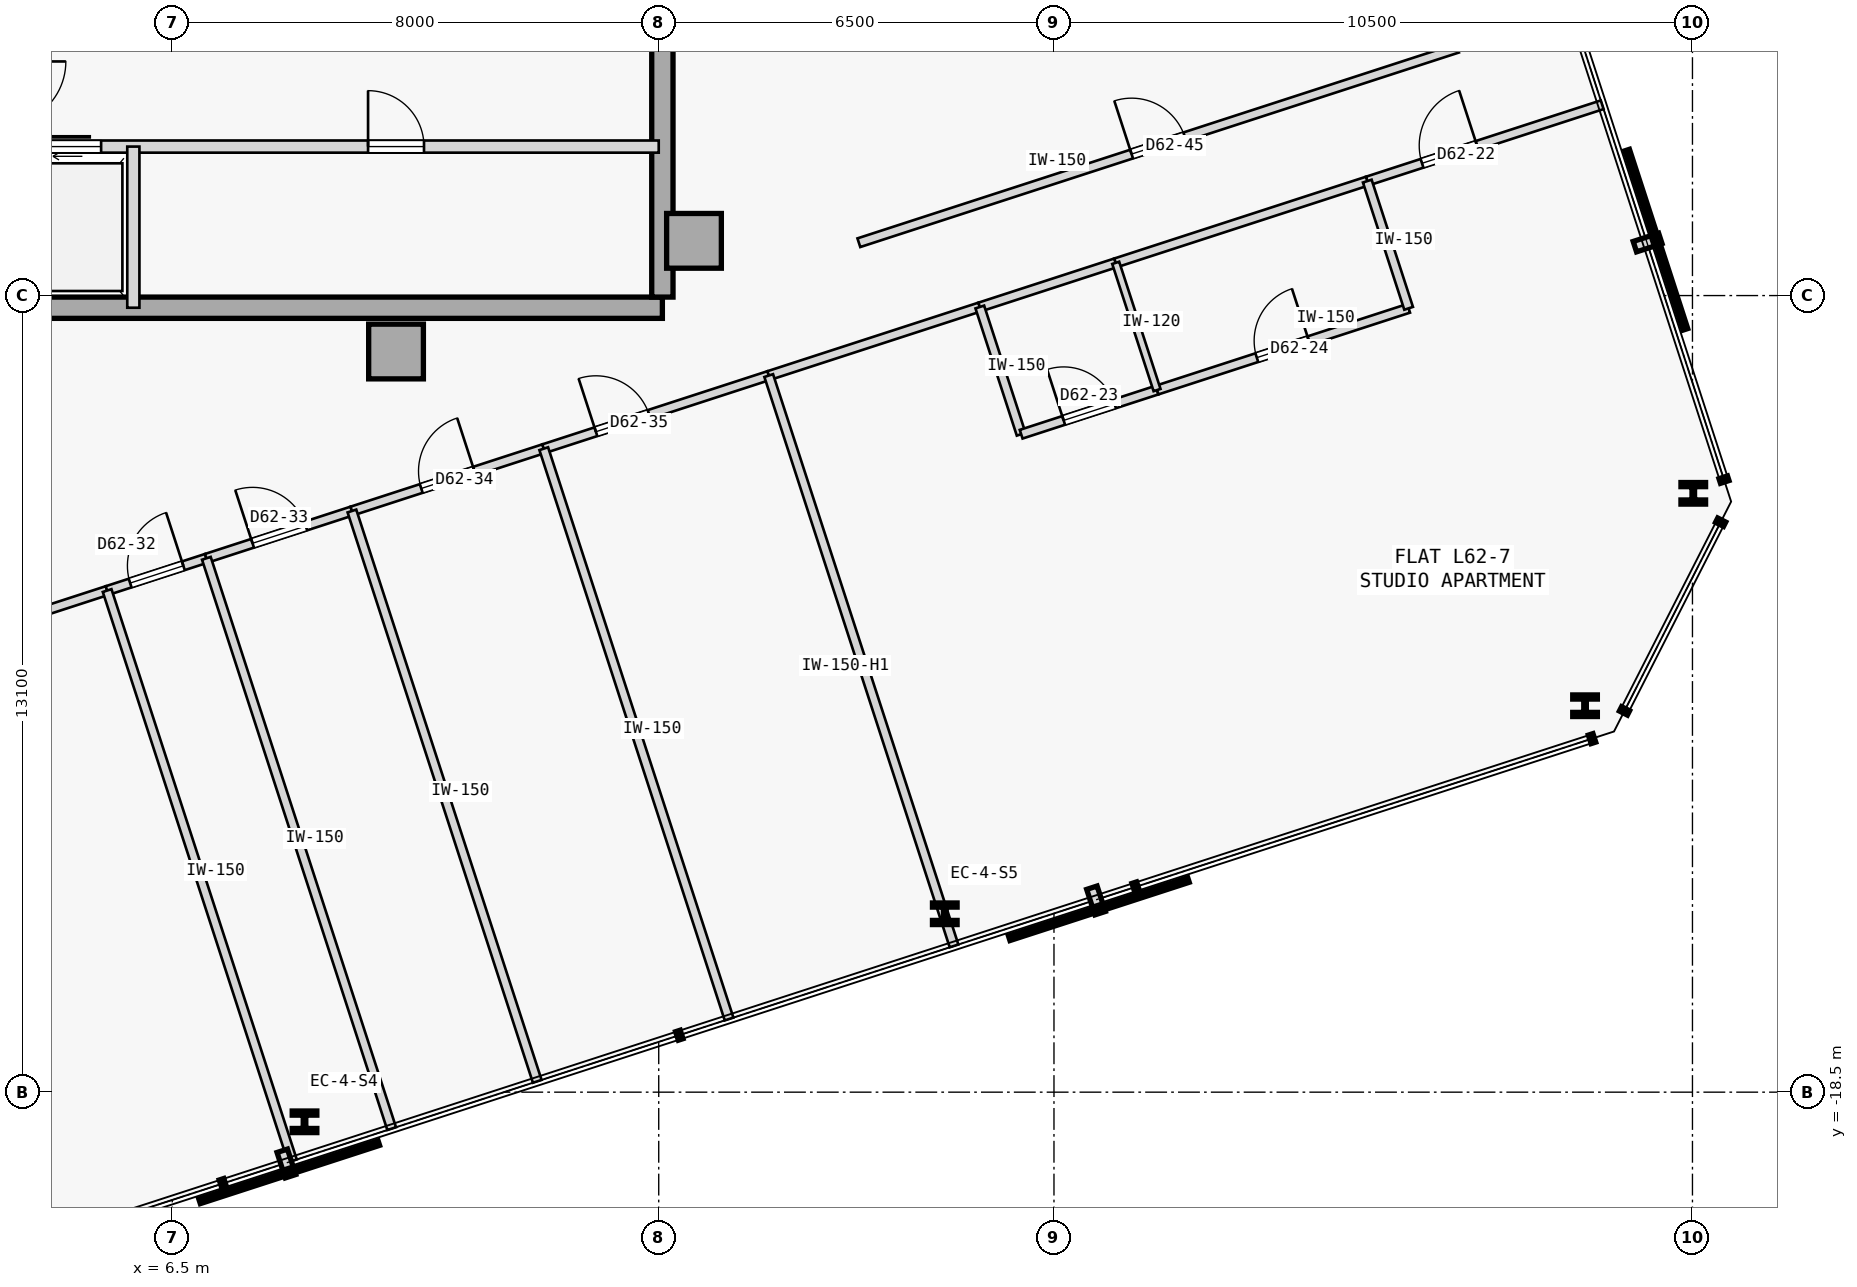
"""IFC4 building model, lengths in metres.
Left out: names, types, materials, properties, quantities, classifications, styles, units other than length and angle.
Written with IfcOpenShell. Run it as: python <this file> out.ifc"""

import sys

from ifc_helpers import new_model, si_unit, direction, frame, frame_2d, origin, origin_2d, place, context, subcontext, project, spatial, rectangle, i_section, extrude, element, fill, save


model = new_model("IFC4")
c1 = context("Model", 3, precision=1e-05, world=origin(), true_north=direction((0.0, 1.0)))
c2 = subcontext(c1, "Body", "Model", "MODEL_VIEW")
j1 = project(units=[si_unit("LENGTHUNIT", "METRE"), si_unit("PLANEANGLEUNIT", "RADIAN")], contexts=[c1])
p1 = place(None, origin())
s1 = spatial("IfcSite", under=j1, at=p1, CompositionType="ELEMENT")
p2 = place(p1, origin())
s2 = spatial("IfcBuilding", under=s1, at=p2, CompositionType="ELEMENT")
p3 = place(p2, frame((0.0, 0.0, 234.35)))
s3 = spatial("IfcBuildingStorey", under=s2, at=p3, CompositionType="ELEMENT", Elevation=234.35)
for number, where, z_axis, x_axis in (
    (1, (15.08, -4.5, 0.0), (0.0, 0.0, 1.0), (1.0, 0.0, 0.0)),
    (2, (10.18, -6.32, 0.0), (0.0, 0.0, 1.0), (1.0, 0.0, 0.0)),
):
    element("IfcColumn", number, at=place(p3, frame(where, z_axis=z_axis, x_axis=x_axis)), inside=s3, PredefinedType="COLUMN", context=c2, shape_type="SweptSolid", body=[
        extrude(rectangle(XDim=0.9, YDim=0.9, at=origin_2d()), origin(), (0.0, 0.0, 1.0), 3.35),
    ])
p4 = place(p3, frame((3.7, -5.6, 0.0), z_axis=(0.0, 0.0, 1.0), x_axis=(1.0, 0.0, 0.0)))
e3 = element("IfcWall", 3, at=p4, inside=s3, PredefinedType="SHEAR", context=c2, shape_type="SweptSolid", body=[
    extrude(rectangle(XDim=10.86, YDim=0.35, at=frame_2d((5.43, 0.0))), origin(), (0.0, 0.0, 1.0), 3.125),
])
p5 = place(p3, frame((14.56, -5.425, 0.0), z_axis=(0.0, 0.0, 1.0), x_axis=(0.0, 1.0, 0.0)))
e4 = element("IfcWall", 4, at=p5, inside=s3, PredefinedType="SHEAR", context=c2, shape_type="SweptSolid", body=[
    extrude(rectangle(XDim=10.85, YDim=0.35, at=frame_2d((5.425, 0.0))), origin(), (0.0, 0.0, 1.0), 3.125),
])
for number, where, z_axis, x_axis in (
    (5, (8.675, -18.988, 0.0), (0.0, 0.0, 1.0), (1.0, 0.0, 0.0)),
    (6, (19.204, -15.566, 0.0), (0.0, 0.0, 1.0), (1.0, 0.0, 0.0)),
    (7, (29.734, -12.145, 0.0), (0.0, 0.0, 1.0), (1.0, 0.0, 0.0)),
    (8, (31.513, -8.652, 0.0), (0.0, 0.0, 1.0), (1.0, 0.0, 0.0)),
):
    element("IfcColumn", number, at=place(p3, frame(where, z_axis=z_axis, x_axis=x_axis)), inside=s3, PredefinedType="COLUMN", context=c2, shape_type="SweptSolid", body=[
        extrude(i_section(OverallWidth=0.405, OverallDepth=0.355, WebThickness=0.042, FlangeThickness=0.068, FilletRadius=0.015, at=origin_2d()), origin(), (0.0, 0.0, 1.0), 3.35),
    ])
p6 = place(p3, frame((3.7, -2.95, 0.0), z_axis=(0.0, 0.0, 1.0), x_axis=(1.0, 0.0, 0.0)))
e9 = element("IfcWall", 9, at=p6, inside=s3, PredefinedType="STANDARD", context=c2, shape_type="SweptSolid", body=[
    extrude(rectangle(XDim=10.8, YDim=0.2, at=frame_2d((5.4, 0.0))), origin(), (0.0, 0.0, 1.0), 3.125),
])
p7 = place(p6, frame((0.53, 0.0, 0.0)))
e10 = element("IfcOpeningElement", 10, at=p7, cuts=e9, PredefinedType="OPENING", context=c2, shape_type="SweptSolid", body=[
    extrude(rectangle(XDim=1.1, YDim=2.15, at=frame_2d((0.55, 1.075))), frame((0.0, 0.11, 0.0), z_axis=(0.0, -1.0, 0.0), x_axis=(1.0, 0.0, 0.0)), (0.0, 0.0, 1.0), 0.22),
])
p8 = place(p6, frame((6.02, 0.0, 0.0)))
e11 = element("IfcOpeningElement", 11, at=p8, cuts=e9, PredefinedType="OPENING", context=c2, shape_type="SweptSolid", body=[
    extrude(rectangle(XDim=0.92, YDim=2.15, at=frame_2d((0.46, 1.075))), frame((0.0, 0.11, 0.0), z_axis=(0.0, -1.0, 0.0), x_axis=(1.0, 0.0, 0.0)), (0.0, 0.0, 1.0), 0.22),
])
p9 = place(p3, frame((5.86, -5.6, 0.0), z_axis=(0.0, 0.0, 1.0), x_axis=(0.0, 1.0, 0.0)))
e12 = element("IfcWall", 12, at=p9, inside=s3, PredefinedType="STANDARD", context=c2, shape_type="SweptSolid", body=[
    extrude(rectangle(XDim=2.65, YDim=0.2, at=frame_2d((1.325, 0.0))), origin(), (0.0, 0.0, 1.0), 3.125),
])
p10 = place(p3, frame((1.98, -11.372, 0.0), z_axis=(0.0, 0.0, 1.0), x_axis=(0.951052868128, 0.309028222052, 0.0)))
e13 = element("IfcWall", 13, at=p10, inside=s3, PredefinedType="PARTITIONING", context=c2, shape_type="SweptSolid", body=[
    extrude(rectangle(XDim=3.626, YDim=0.15, at=frame_2d((1.813, 0.0))), origin(), (0.0, 0.0, 1.0), 3.125),
])
p11 = place(p3, frame((16.309, -6.716, 0.0), z_axis=(0.0, 0.0, 1.0), x_axis=(0.951057168147, 0.309014988174, 0.0)))
e14 = element("IfcWall", 14, at=p11, inside=s3, PredefinedType="PARTITIONING", context=c2, shape_type="SweptSolid", body=[
    extrude(rectangle(XDim=3.65, YDim=0.15, at=frame_2d((1.825, 0.0))), origin(), (0.0, 0.0, 1.0), 3.125),
])
p12 = place(p3, frame((26.152, -3.518, 0.0), z_axis=(0.0, 0.0, 1.0), x_axis=(0.951048201303, 0.309042584119, 0.0)))
e15 = element("IfcWall", 15, at=p12, inside=s3, PredefinedType="PARTITIONING", context=c2, shape_type="SweptSolid", body=[
    extrude(rectangle(XDim=4.062, YDim=0.15, at=frame_2d((2.031, 0.0))), origin(), (0.0, 0.0, 1.0), 3.125),
])
p13 = place(p12, frame((0.947, 0.0, 0.0)))
e16 = element("IfcOpeningElement", 16, at=p13, cuts=e15, PredefinedType="OPENING", context=c2, shape_type="SweptSolid", body=[
    extrude(rectangle(XDim=0.95, YDim=2.15, at=frame_2d((0.475, 1.075))), frame((0.0, 0.085, 0.0), z_axis=(0.0, -1.0, 0.0), x_axis=(1.0, 0.0, 0.0)), (0.0, 0.0, 1.0), 0.17),
])
p14 = place(p3, frame((19.78, -5.588, 0.0), z_axis=(0.0, 0.0, 1.0), x_axis=(0.951076048914, 0.308956872689, 0.0)))
e17 = element("IfcWall", 17, at=p14, inside=s3, PredefinedType="PARTITIONING", context=c2, shape_type="SweptSolid", body=[
    extrude(rectangle(XDim=2.35, YDim=0.15, at=frame_2d((1.175, 0.0))), origin(), (0.0, 0.0, 1.0), 3.125),
])
p15 = place(p3, frame((22.015, -4.862, 0.0), z_axis=(0.0, 0.0, 1.0), x_axis=(0.951052627573, 0.309028962374, 0.0)))
e18 = element("IfcWall", 18, at=p15, inside=s3, PredefinedType="PARTITIONING", context=c2, shape_type="SweptSolid", body=[
    extrude(rectangle(XDim=4.35, YDim=0.15, at=frame_2d((2.175, 0.0))), origin(), (0.0, 0.0, 1.0), 3.125),
])
p16 = place(p3, frame((5.429, -10.251, 0.0), z_axis=(0.0, 0.0, 1.0), x_axis=(0.95104661559, 0.309047463953, 0.0)))
e19 = element("IfcWall", 19, at=p16, inside=s3, PredefinedType="PARTITIONING", context=c2, shape_type="SweptSolid", body=[
    extrude(rectangle(XDim=1.716, YDim=0.15, at=frame_2d((0.858, 0.0))), origin(), (0.0, 0.0, 1.0), 3.125),
])
p17 = place(p16, frame((0.398, 0.0, 0.0)))
e20 = element("IfcOpeningElement", 20, at=p17, cuts=e19, PredefinedType="OPENING", context=c2, shape_type="SweptSolid", body=[
    extrude(rectangle(XDim=0.92, YDim=2.15, at=frame_2d((0.46, 1.075))), frame((0.0, 0.085, 0.0), z_axis=(0.0, -1.0, 0.0), x_axis=(1.0, 0.0, 0.0)), (0.0, 0.0, 1.0), 0.17),
])
p18 = place(p3, frame((7.061, -9.721, 0.0), z_axis=(0.0, 0.0, 1.0), x_axis=(0.951051887333, 0.309031240494, 0.0)))
e21 = element("IfcWall", 21, at=p18, inside=s3, PredefinedType="PARTITIONING", context=c2, shape_type="SweptSolid", body=[
    extrude(rectangle(XDim=2.517, YDim=0.15, at=frame_2d((1.259, 0.0))), origin(), (0.0, 0.0, 1.0), 3.125),
])
p19 = place(p18, frame((0.799, 0.0, 0.0)))
e22 = element("IfcOpeningElement", 22, at=p19, cuts=e21, PredefinedType="OPENING", context=c2, shape_type="SweptSolid", body=[
    extrude(rectangle(XDim=0.92, YDim=2.15, at=frame_2d((0.46, 1.075))), frame((0.0, 0.085, 0.0), z_axis=(0.0, -1.0, 0.0), x_axis=(1.0, 0.0, 0.0)), (0.0, 0.0, 1.0), 0.17),
])
p20 = place(p3, frame((9.455, -8.943, 0.0), z_axis=(0.0, 0.0, 1.0), x_axis=(0.951069760241, 0.30897623073, 0.0)))
e23 = element("IfcWall", 23, at=p20, inside=s3, PredefinedType="PARTITIONING", context=c2, shape_type="SweptSolid", body=[
    extrude(rectangle(XDim=3.317, YDim=0.15, at=frame_2d((1.659, 0.0))), origin(), (0.0, 0.0, 1.0), 3.125),
])
p21 = place(p20, frame((1.198, 0.0, 0.0)))
e24 = element("IfcOpeningElement", 24, at=p21, cuts=e23, PredefinedType="OPENING", context=c2, shape_type="SweptSolid", body=[
    extrude(rectangle(XDim=0.92, YDim=2.15, at=frame_2d((0.46, 1.075))), frame((0.0, 0.085, 0.0), z_axis=(0.0, -1.0, 0.0), x_axis=(1.0, 0.0, 0.0)), (0.0, 0.0, 1.0), 0.17),
])
p22 = place(p3, frame((12.609, -7.918, 0.0), z_axis=(0.0, 0.0, 1.0), x_axis=(0.951047443558, 0.309044915995, 0.0)))
e25 = element("IfcWall", 25, at=p22, inside=s3, PredefinedType="PARTITIONING", context=c2, shape_type="SweptSolid", body=[
    extrude(rectangle(XDim=3.89, YDim=0.15, at=frame_2d((1.945, 0.0))), origin(), (0.0, 0.0, 1.0), 3.125),
])
p23 = place(p22, frame((0.902, 0.0, 0.0)))
e26 = element("IfcOpeningElement", 26, at=p23, cuts=e25, PredefinedType="OPENING", context=c2, shape_type="SweptSolid", body=[
    extrude(rectangle(XDim=0.92, YDim=2.15, at=frame_2d((0.46, 1.075))), frame((0.0, 0.085, 0.0), z_axis=(0.0, -1.0, 0.0), x_axis=(1.0, 0.0, 0.0)), (0.0, 0.0, 1.0), 0.17),
])
p24 = place(p3, frame((17.791, -4.531, 0.0), z_axis=(0.0, 0.0, 1.0), x_axis=(0.951056769902, 0.309016213852, 0.0)))
e27 = element("IfcWall", 27, at=p24, inside=s3, PredefinedType="PARTITIONING", context=c2, shape_type="SweptSolid", body=[
    extrude(rectangle(XDim=10.352, YDim=0.15, at=frame_2d((5.176, 0.0))), origin(), (0.0, 0.0, 1.0), 3.125),
])
p25 = place(p24, frame((4.716, 0.0, 0.0)))
e28 = element("IfcOpeningElement", 28, at=p25, cuts=e27, PredefinedType="OPENING", context=c2, shape_type="SweptSolid", body=[
    extrude(rectangle(XDim=0.92, YDim=2.15, at=frame_2d((0.46, 1.075))), frame((0.0, 0.085, 0.0), z_axis=(0.0, -1.0, 0.0), x_axis=(1.0, 0.0, 0.0)), (0.0, 0.0, 1.0), 0.17),
])
p26 = place(p3, frame((8.476, -19.63, 0.0), z_axis=(0.0, 0.0, 1.0), x_axis=(-0.308999867152, 0.951062081097, 0.0)))
e29 = element("IfcWall", 29, at=p26, inside=s3, PredefinedType="PARTITIONING", context=c2, shape_type="SweptSolid", body=[
    extrude(rectangle(XDim=9.862, YDim=0.15, at=frame_2d((4.931, 0.0))), origin(), (0.0, 0.0, 1.0), 3.125),
])
p27 = place(p3, frame((20.46, -7.68, 0.0), z_axis=(0.0, 0.0, 1.0), x_axis=(-0.309060979314, 0.951042223598, 0.0)))
e30 = element("IfcWall", 30, at=p27, inside=s3, PredefinedType="PARTITIONING", context=c2, shape_type="SweptSolid", body=[
    extrude(rectangle(XDim=2.2, YDim=0.15, at=frame_2d((1.1, 0.0))), origin(), (0.0, 0.0, 1.0), 3.125),
])
p28 = place(p3, frame((20.46, -7.68, 0.0), z_axis=(0.0, 0.0, 1.0), x_axis=(0.951066131077, 0.308987401554, 0.0)))
e31 = element("IfcWall", 31, at=p28, inside=s3, PredefinedType="PARTITIONING", context=c2, shape_type="SweptSolid", body=[
    extrude(rectangle(XDim=2.35, YDim=0.15, at=frame_2d((1.175, 0.0))), origin(), (0.0, 0.0, 1.0), 3.125),
])
p29 = place(p28, frame((0.735, 0.0, 0.0)))
e32 = element("IfcOpeningElement", 32, at=p29, cuts=e31, PredefinedType="OPENING", context=c2, shape_type="SweptSolid", body=[
    extrude(rectangle(XDim=0.88, YDim=2.15, at=frame_2d((0.44, 1.075))), frame((0.0, 0.085, 0.0), z_axis=(0.0, -1.0, 0.0), x_axis=(1.0, 0.0, 0.0)), (0.0, 0.0, 1.0), 0.17),
])
p30 = place(p3, frame((22.695, -6.954, 0.0), z_axis=(0.0, 0.0, 1.0), x_axis=(0.951057987102, 0.309012467661, 0.0)))
e33 = element("IfcWall", 33, at=p30, inside=s3, PredefinedType="PARTITIONING", context=c2, shape_type="SweptSolid", body=[
    extrude(rectangle(XDim=4.35, YDim=0.15, at=frame_2d((2.175, 0.0))), origin(), (0.0, 0.0, 1.0), 3.125),
])
p31 = place(p30, frame((1.725, 0.0, 0.0)))
e34 = element("IfcOpeningElement", 34, at=p31, cuts=e33, PredefinedType="OPENING", context=c2, shape_type="SweptSolid", body=[
    extrude(rectangle(XDim=0.9, YDim=2.15, at=frame_2d((0.45, 1.075))), frame((0.0, 0.085, 0.0), z_axis=(0.0, -1.0, 0.0), x_axis=(1.0, 0.0, 0.0)), (0.0, 0.0, 1.0), 0.17),
])
p32 = place(p3, frame((26.832, -5.61, 0.0), z_axis=(0.0, 0.0, 1.0), x_axis=(-0.309060979314, 0.951042223598, 0.0)))
e35 = element("IfcWall", 35, at=p32, inside=s3, PredefinedType="PARTITIONING", context=c2, shape_type="SweptSolid", body=[
    extrude(rectangle(XDim=2.2, YDim=0.15, at=frame_2d((1.1, 0.0))), origin(), (0.0, 0.0, 1.0), 3.125),
])
p33 = place(p3, frame((19.356, -16.095, 0.0), z_axis=(0.0, 0.0, 1.0), x_axis=(-0.309022258842, 0.95105480575, 0.0)))
e36 = element("IfcWall", 36, at=p33, inside=s3, PredefinedType="PARTITIONING", context=c2, shape_type="SweptSolid", body=[
    extrude(rectangle(XDim=9.862, YDim=0.15, at=frame_2d((4.931, 0.0))), origin(), (0.0, 0.0, 1.0), 2.675),
])
p34 = place(p3, frame((22.695, -6.954, 0.0), z_axis=(0.0, 0.0, 1.0), x_axis=(-0.308960600764, 0.951074837842, 0.0)))
e37 = element("IfcWall", 37, at=p34, inside=s3, PredefinedType="PARTITIONING", context=c2, shape_type="SweptSolid", body=[
    extrude(rectangle(XDim=2.2, YDim=0.12, at=frame_2d((1.1, 0.0))), origin(), (0.0, 0.0, 1.0), 3.125),
])
for number, where, z_axis, x_axis in (
    (38, (10.108, -19.1, 0.0), (0.0, 0.0, 1.0), (-0.309, 0.951, 0.0)),
    (39, (12.502, -18.322, 0.0), (0.0, 0.0, 1.0), (-0.309, 0.951, 0.0)),
):
    element("IfcWall", number, at=place(p3, frame(where, z_axis=z_axis, x_axis=x_axis)), inside=s3, PredefinedType="PARTITIONING", context=c2, shape_type="SweptSolid", body=[
        extrude(rectangle(XDim=9.862, YDim=0.15, at=frame_2d((4.931, 0.0))), origin(), (0.0, 0.0, 1.0), 3.125),
    ])
p35 = place(p3, frame((15.657, -17.297, 0.0), z_axis=(0.0, 0.0, 1.0), x_axis=(-0.309029534558, 0.951052441651, 0.0)))
e40 = element("IfcWall", 40, at=p35, inside=s3, PredefinedType="PARTITIONING", context=c2, shape_type="SweptSolid", body=[
    extrude(rectangle(XDim=9.862, YDim=0.15, at=frame_2d((4.931, 0.0))), origin(), (0.0, 0.0, 1.0), 3.125),
])
p36 = place(p7, origin())
e41 = element("IfcDoor", 41, at=p36, inside=s3, OperationType="SLIDING_TO_RIGHT", PredefinedType="DOOR", context=c2, shape_type="SweptSolid", body=[
    extrude(rectangle(XDim=1.1, YDim=2.15, at=frame_2d((0.55, 1.075))), frame((0.0, 0.025, 0.0), z_axis=(0.0, -1.0, 0.0), x_axis=(1.0, 0.0, 0.0)), (0.0, 0.0, 1.0), 0.05),
])
fill(e10, e41)
p37 = place(p8, origin())
e42 = element("IfcDoor", 42, at=p37, inside=s3, OperationType="SINGLE_SWING_LEFT", PredefinedType="DOOR", context=c2, shape_type="SweptSolid", body=[
    extrude(rectangle(XDim=0.92, YDim=2.15, at=frame_2d((0.46, 1.075))), frame((0.0, 0.025, 0.0), z_axis=(0.0, -1.0, 0.0), x_axis=(1.0, 0.0, 0.0)), (0.0, 0.0, 1.0), 0.05),
])
fill(e11, e42)
p38 = place(p13, origin())
e43 = element("IfcDoor", 43, at=p38, inside=s3, OperationType="SINGLE_SWING_RIGHT", PredefinedType="DOOR", context=c2, shape_type="SweptSolid", body=[
    extrude(rectangle(XDim=0.95, YDim=2.15, at=frame_2d((0.475, 1.075))), frame((0.0, 0.025, 0.0), z_axis=(0.0, -1.0, 0.0), x_axis=(1.0, 0.0, 0.0)), (0.0, 0.0, 1.0), 0.05),
])
fill(e16, e43)
p39 = place(p29, origin())
e44 = element("IfcDoor", 44, at=p39, inside=s3, OperationType="SINGLE_SWING_LEFT", PredefinedType="DOOR", context=c2, shape_type="SweptSolid", body=[
    extrude(rectangle(XDim=0.88, YDim=2.15, at=frame_2d((0.44, 1.075))), frame((0.0, 0.025, 0.0), z_axis=(0.0, -1.0, 0.0), x_axis=(1.0, 0.0, 0.0)), (0.0, 0.0, 1.0), 0.05),
])
fill(e32, e44)
p40 = place(p31, origin())
e45 = element("IfcDoor", 45, at=p40, inside=s3, OperationType="SINGLE_SWING_RIGHT", PredefinedType="DOOR", context=c2, shape_type="SweptSolid", body=[
    extrude(rectangle(XDim=0.9, YDim=2.15, at=frame_2d((0.45, 1.075))), frame((0.0, 0.025, 0.0), z_axis=(0.0, -1.0, 0.0), x_axis=(1.0, 0.0, 0.0)), (0.0, 0.0, 1.0), 0.05),
])
fill(e34, e45)
p41 = place(p17, origin())
e46 = element("IfcDoor", 46, at=p41, inside=s3, OperationType="SINGLE_SWING_RIGHT", PredefinedType="DOOR", context=c2, shape_type="SweptSolid", body=[
    extrude(rectangle(XDim=0.92, YDim=2.15, at=frame_2d((0.46, 1.075))), frame((0.0, 0.025, 0.0), z_axis=(0.0, -1.0, 0.0), x_axis=(1.0, 0.0, 0.0)), (0.0, 0.0, 1.0), 0.05),
])
fill(e20, e46)
p42 = place(p19, origin())
e47 = element("IfcDoor", 47, at=p42, inside=s3, OperationType="SINGLE_SWING_LEFT", PredefinedType="DOOR", context=c2, shape_type="SweptSolid", body=[
    extrude(rectangle(XDim=0.92, YDim=2.15, at=frame_2d((0.46, 1.075))), frame((0.0, 0.025, 0.0), z_axis=(0.0, -1.0, 0.0), x_axis=(1.0, 0.0, 0.0)), (0.0, 0.0, 1.0), 0.05),
])
fill(e22, e47)
p43 = place(p21, origin())
e48 = element("IfcDoor", 48, at=p43, inside=s3, OperationType="SINGLE_SWING_RIGHT", PredefinedType="DOOR", context=c2, shape_type="SweptSolid", body=[
    extrude(rectangle(XDim=0.92, YDim=2.15, at=frame_2d((0.46, 1.075))), frame((0.0, 0.025, 0.0), z_axis=(0.0, -1.0, 0.0), x_axis=(1.0, 0.0, 0.0)), (0.0, 0.0, 1.0), 0.05),
])
fill(e24, e48)
p44 = place(p23, origin())
e49 = element("IfcDoor", 49, at=p44, inside=s3, OperationType="SINGLE_SWING_LEFT", PredefinedType="DOOR", context=c2, shape_type="SweptSolid", body=[
    extrude(rectangle(XDim=0.92, YDim=2.15, at=frame_2d((0.46, 1.075))), frame((0.0, 0.025, 0.0), z_axis=(0.0, -1.0, 0.0), x_axis=(1.0, 0.0, 0.0)), (0.0, 0.0, 1.0), 0.05),
])
fill(e26, e49)
p45 = place(p25, origin())
e50 = element("IfcDoor", 50, at=p45, inside=s3, OperationType="SINGLE_SWING_LEFT", PredefinedType="DOOR", context=c2, shape_type="SweptSolid", body=[
    extrude(rectangle(XDim=0.92, YDim=2.15, at=frame_2d((0.46, 1.075))), frame((0.0, 0.025, 0.0), z_axis=(0.0, -1.0, 0.0), x_axis=(1.0, 0.0, 0.0)), (0.0, 0.0, 1.0), 0.05),
])
fill(e28, e50)
save(model, sys.argv[1])
